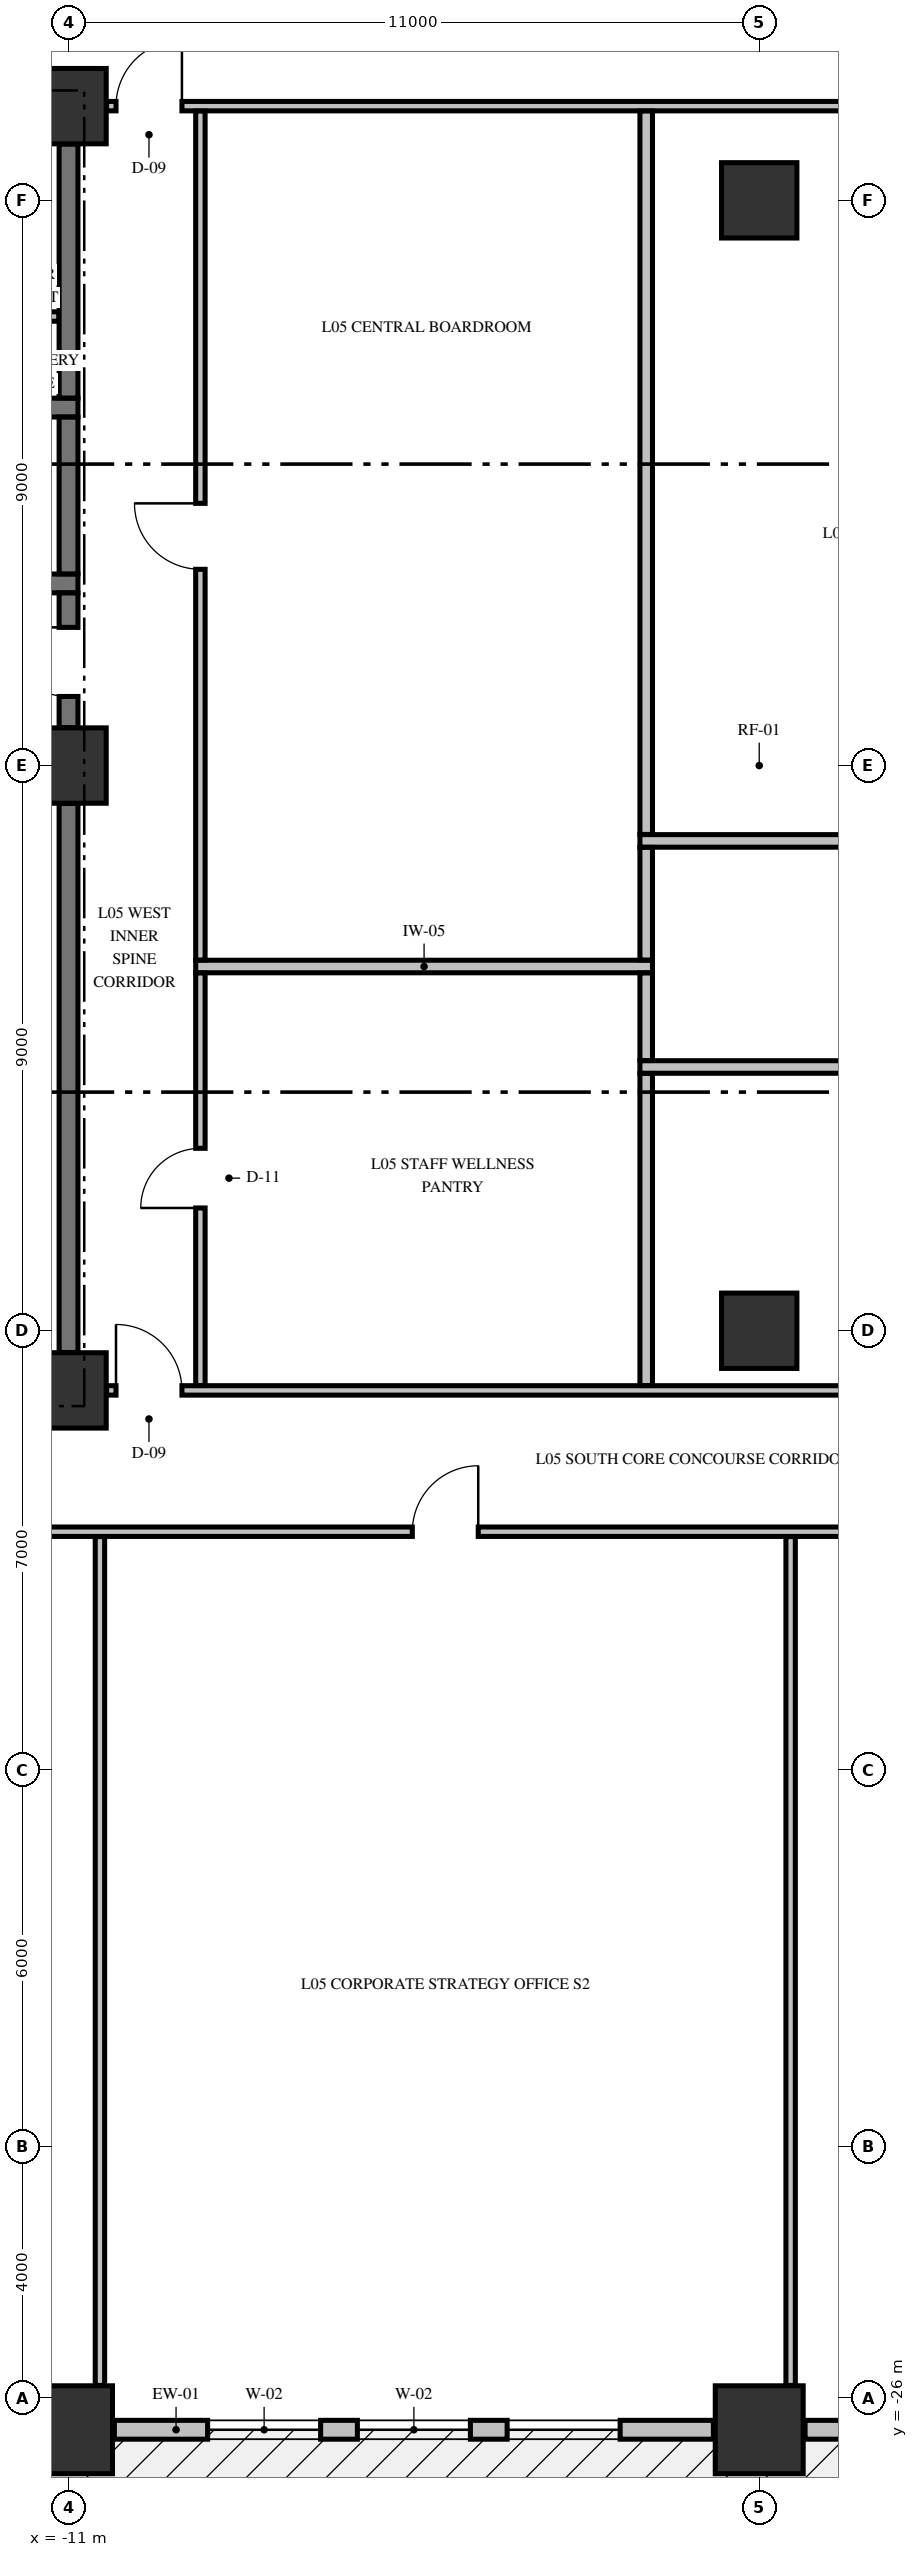
"""IFC4 building model, lengths in metres.
Left out: names, types, materials, properties, quantities, classifications, styles, units other than length and angle.
Written with IfcOpenShell. Run it as: python <this file> out.ifc"""

import sys

from ifc_helpers import new_model, si_unit, direction, frame, frame_2d, origin, origin_2d, place, context, subcontext, project, spatial, rectangle, extrude, element, fill, save


model = new_model("IFC4")
c1 = context("Model", 3, precision=1e-05, world=origin(), true_north=direction((0.0, 1.0)))
c2 = subcontext(c1, "Body", "Model", "MODEL_VIEW")
j1 = project(units=[si_unit("LENGTHUNIT", "METRE"), si_unit("PLANEANGLEUNIT", "RADIAN")], contexts=[c1])
p1 = place(None, origin())
s1 = spatial("IfcSite", under=j1, at=p1, CompositionType="ELEMENT")
p2 = place(p1, origin())
s2 = spatial("IfcBuilding", under=s1, at=p2, CompositionType="ELEMENT")
p3 = place(p2, frame((0.0, 0.0, 27.2)))
s3 = spatial("IfcBuildingStorey", under=s2, at=p3, CompositionType="ELEMENT", Elevation=27.2)
for number, where, z_axis, x_axis in (
    (1, (-11.0, -26.5, -0.45), (0.0, 0.0, 1.0), (1.0, 0.0, 0.0)),
    (2, (0.0, -26.5, -0.45), (0.0, 0.0, 1.0), (1.0, 0.0, 0.0)),
):
    element("IfcColumn", number, at=place(p3, frame(where, z_axis=z_axis, x_axis=x_axis)), inside=s3, PredefinedType="COLUMN", context=c2, shape_type="SweptSolid", body=[
        extrude(rectangle(XDim=1.4, YDim=1.4, at=origin_2d()), origin(), (0.0, 0.0, 1.0), 3.77),
    ])
for number, where, z_axis, x_axis in (
    (3, (-11.0, -9.95, -0.45), (0.0, 0.0, 1.0), (1.0, 0.0, 0.0)),
    (4, (-11.0, 0.0, -0.45), (0.0, 0.0, 1.0), (1.0, 0.0, 0.0)),
    (5, (-11.0, 10.5, -0.45), (0.0, 0.0, 1.0), (1.0, 0.0, 0.0)),
    (6, (0.0, -9.0, -0.45), (0.0, 0.0, 1.0), (1.0, 0.0, 0.0)),
    (7, (0.0, 9.0, -0.45), (0.0, 0.0, 1.0), (1.0, 0.0, 0.0)),
):
    element("IfcColumn", number, at=place(p3, frame(where, z_axis=z_axis, x_axis=x_axis)), inside=s3, PredefinedType="COLUMN", context=c2, shape_type="SweptSolid", body=[
        extrude(rectangle(XDim=1.2, YDim=1.2, at=origin_2d()), origin(), (0.0, 0.0, 1.0), 3.77),
    ])
p4 = place(p3, frame((-10.27, -26.5, 0.0), z_axis=(0.0, 0.0, 1.0), x_axis=(1.0, 0.0, 0.0)))
e8 = element("IfcWall", 8, at=p4, inside=s3, PredefinedType="STANDARD", context=c2, shape_type="SweptSolid", body=[
    extrude(rectangle(XDim=9.54, YDim=0.3, at=frame_2d((4.77, 0.0))), origin(), (0.0, 0.0, 1.0), 2.712),
])
p5 = place(p4, frame((1.485, 0.0, 0.78)))
e9 = element("IfcOpeningElement", 9, at=p5, cuts=e8, PredefinedType="OPENING", context=c2, shape_type="SweptSolid", body=[
    extrude(rectangle(XDim=1.8, YDim=1.72, at=frame_2d((0.9, 0.86))), frame((0.0, 0.16, 0.0), z_axis=(0.0, -1.0, 0.0), x_axis=(1.0, 0.0, 0.0)), (0.0, 0.0, 1.0), 0.32),
])
p6 = place(p4, frame((3.87, 0.0, 0.78)))
e10 = element("IfcOpeningElement", 10, at=p6, cuts=e8, PredefinedType="OPENING", context=c2, shape_type="SweptSolid", body=[
    extrude(rectangle(XDim=1.8, YDim=1.72, at=frame_2d((0.9, 0.86))), frame((0.0, 0.16, 0.0), z_axis=(0.0, -1.0, 0.0), x_axis=(1.0, 0.0, 0.0)), (0.0, 0.0, 1.0), 0.32),
])
p7 = place(p4, frame((6.255, 0.0, 0.78)))
e11 = element("IfcOpeningElement", 11, at=p7, cuts=e8, PredefinedType="OPENING", context=c2, shape_type="SweptSolid", body=[
    extrude(rectangle(XDim=1.8, YDim=1.72, at=frame_2d((0.9, 0.86))), frame((0.0, 0.16, 0.0), z_axis=(0.0, -1.0, 0.0), x_axis=(1.0, 0.0, 0.0)), (0.0, 0.0, 1.0), 0.32),
])
p8 = place(p3, frame((0.73, -26.5, 0.0), z_axis=(0.0, 0.0, 1.0), x_axis=(1.0, 0.0, 0.0)))
e12 = element("IfcWall", 12, at=p8, inside=s3, PredefinedType="STANDARD", context=c2, shape_type="SweptSolid", body=[
    extrude(rectangle(XDim=9.54, YDim=0.3, at=frame_2d((4.77, 0.0))), origin(), (0.0, 0.0, 1.0), 2.712),
])
p9 = place(p8, frame((1.485, 0.0, 0.78)))
e13 = element("IfcOpeningElement", 13, at=p9, cuts=e12, PredefinedType="OPENING", context=c2, shape_type="SweptSolid", body=[
    extrude(rectangle(XDim=1.8, YDim=1.72, at=frame_2d((0.9, 0.86))), frame((0.0, 0.16, 0.0), z_axis=(0.0, -1.0, 0.0), x_axis=(1.0, 0.0, 0.0)), (0.0, 0.0, 1.0), 0.32),
])
p10 = place(p8, frame((3.87, 0.0, 0.78)))
e14 = element("IfcOpeningElement", 14, at=p10, cuts=e12, PredefinedType="OPENING", context=c2, shape_type="SweptSolid", body=[
    extrude(rectangle(XDim=1.8, YDim=1.72, at=frame_2d((0.9, 0.86))), frame((0.0, 0.16, 0.0), z_axis=(0.0, -1.0, 0.0), x_axis=(1.0, 0.0, 0.0)), (0.0, 0.0, 1.0), 0.32),
])
p11 = place(p8, frame((6.255, 0.0, 0.78)))
e15 = element("IfcOpeningElement", 15, at=p11, cuts=e12, PredefinedType="OPENING", context=c2, shape_type="SweptSolid", body=[
    extrude(rectangle(XDim=1.8, YDim=1.72, at=frame_2d((0.9, 0.86))), frame((0.0, 0.16, 0.0), z_axis=(0.0, -1.0, 0.0), x_axis=(1.0, 0.0, 0.0)), (0.0, 0.0, 1.0), 0.32),
])
p12 = place(p3, frame((-14.875, 2.9, 0.0), z_axis=(0.0, 0.0, 1.0), x_axis=(1.0, 0.0, 0.0)))
e16 = element("IfcWall", 16, at=p12, inside=s3, PredefinedType="SHEAR", context=c2, shape_type="SweptSolid", body=[
    extrude(rectangle(XDim=4.025, YDim=0.3, at=frame_2d((2.012, 0.0))), origin(), (0.0, 0.0, 1.0), 3.32),
])
p13 = place(p12, frame((2.075, 0.0, 0.0)))
e17 = element("IfcOpeningElement", 17, at=p13, cuts=e16, PredefinedType="OPENING", context=c2, shape_type="SweptSolid", body=[
    extrude(rectangle(XDim=1.1, YDim=2.2, at=frame_2d((0.55, 1.1))), frame((0.0, 0.16, 0.0), z_axis=(0.0, -1.0, 0.0), x_axis=(1.0, 0.0, 0.0)), (0.0, 0.0, 1.0), 0.32),
])
p14 = place(p3, frame((-14.875, 5.7, 0.0), z_axis=(0.0, 0.0, 1.0), x_axis=(1.0, 0.0, 0.0)))
e18 = element("IfcWall", 18, at=p14, inside=s3, PredefinedType="SHEAR", context=c2, shape_type="SweptSolid", body=[
    extrude(rectangle(XDim=4.025, YDim=0.3, at=frame_2d((2.012, 0.0))), origin(), (0.0, 0.0, 1.0), 3.32),
])
p15 = place(p3, frame((-23.835, -12.2, 0.0), z_axis=(0.0, 0.0, 1.0), x_axis=(1.0, 0.0, 0.0)))
e19 = element("IfcWall", 19, at=p15, inside=s3, PredefinedType="PARTITIONING", context=c2, shape_type="SweptSolid", body=[
    extrude(rectangle(XDim=52.67, YDim=0.15, at=frame_2d((26.335, 0.0))), origin(), (0.0, 0.0, 1.0), 3.32),
])
p16 = place(p15, frame((8.16, 0.0, 0.0)))
e20 = element("IfcOpeningElement", 20, at=p16, cuts=e19, PredefinedType="OPENING", context=c2, shape_type="SweptSolid", body=[
    extrude(rectangle(XDim=1.05, YDim=2.15, at=frame_2d((0.525, 1.075))), frame((0.0, 0.085, 0.0), z_axis=(0.0, -1.0, 0.0), x_axis=(1.0, 0.0, 0.0)), (0.0, 0.0, 1.0), 0.17),
])
p17 = place(p15, frame((18.31, 0.0, 0.0)))
e21 = element("IfcOpeningElement", 21, at=p17, cuts=e19, PredefinedType="OPENING", context=c2, shape_type="SweptSolid", body=[
    extrude(rectangle(XDim=1.05, YDim=2.15, at=frame_2d((0.525, 1.075))), frame((0.0, 0.085, 0.0), z_axis=(0.0, -1.0, 0.0), x_axis=(1.0, 0.0, 0.0)), (0.0, 0.0, 1.0), 0.17),
])
p18 = place(p15, frame((41.46, 0.0, 0.0)))
e22 = element("IfcOpeningElement", 22, at=p18, cuts=e19, PredefinedType="OPENING", context=c2, shape_type="SweptSolid", body=[
    extrude(rectangle(XDim=1.05, YDim=2.15, at=frame_2d((0.525, 1.075))), frame((0.0, 0.085, 0.0), z_axis=(0.0, -1.0, 0.0), x_axis=(1.0, 0.0, 0.0)), (0.0, 0.0, 1.0), 0.17),
])
p19 = place(p3, frame((-10.394, -9.95, 0.0), z_axis=(0.0, 0.0, 1.0), x_axis=(1.0, 0.0, 0.0)))
e23 = element("IfcWall", 23, at=p19, inside=s3, PredefinedType="PARTITIONING", context=c2, shape_type="SweptSolid", body=[
    extrude(rectangle(XDim=20.788, YDim=0.15, at=frame_2d((10.394, 0.0))), origin(), (0.0, 0.0, 1.0), 3.32),
])
p20 = place(p19, frame((0.15, 0.0, 0.0)))
e24 = element("IfcOpeningElement", 24, at=p20, cuts=e23, PredefinedType="OPENING", context=c2, shape_type="SweptSolid", body=[
    extrude(rectangle(XDim=1.05, YDim=2.15, at=frame_2d((0.525, 1.075))), frame((0.0, 0.085, 0.0), z_axis=(0.0, -1.0, 0.0), x_axis=(1.0, 0.0, 0.0)), (0.0, 0.0, 1.0), 0.17),
])
p21 = place(p19, frame((19.588, 0.0, 0.0)))
e25 = element("IfcOpeningElement", 25, at=p21, cuts=e23, PredefinedType="OPENING", context=c2, shape_type="SweptSolid", body=[
    extrude(rectangle(XDim=1.05, YDim=2.15, at=frame_2d((0.525, 1.075))), frame((0.0, 0.085, 0.0), z_axis=(0.0, -1.0, 0.0), x_axis=(1.0, 0.0, 0.0)), (0.0, 0.0, 1.0), 0.17),
])
p22 = place(p19, frame((11.969, 0.0, 0.0)))
e26 = element("IfcOpeningElement", 26, at=p22, cuts=e23, PredefinedType="OPENING", context=c2, shape_type="SweptSolid", body=[
    extrude(rectangle(XDim=0.95, YDim=2.15, at=frame_2d((0.475, 1.075))), frame((0.0, 0.085, 0.0), z_axis=(0.0, -1.0, 0.0), x_axis=(1.0, 0.0, 0.0)), (0.0, 0.0, 1.0), 0.17),
])
p23 = place(p3, frame((-1.9, -4.8, 0.0), z_axis=(0.0, 0.0, 1.0), x_axis=(1.0, 0.0, 0.0)))
e27 = element("IfcWall", 27, at=p23, inside=s3, PredefinedType="PARTITIONING", context=c2, shape_type="SweptSolid", body=[
    extrude(rectangle(XDim=10.875, YDim=0.2, at=frame_2d((5.438, 0.0))), origin(), (0.0, 0.0, 1.0), 3.32),
])
p24 = place(p3, frame((-8.975, -3.2, 0.0), z_axis=(0.0, 0.0, 1.0), x_axis=(1.0, 0.0, 0.0)))
e28 = element("IfcWall", 28, at=p24, inside=s3, PredefinedType="PARTITIONING", context=c2, shape_type="SweptSolid", body=[
    extrude(rectangle(XDim=7.275, YDim=0.2, at=frame_2d((3.638, 0.0))), origin(), (0.0, 0.0, 1.0), 3.32),
])
p25 = place(p3, frame((-1.9, -1.2, 0.0), z_axis=(0.0, 0.0, 1.0), x_axis=(1.0, 0.0, 0.0)))
e29 = element("IfcWall", 29, at=p25, inside=s3, PredefinedType="PARTITIONING", context=c2, shape_type="SweptSolid", body=[
    extrude(rectangle(XDim=10.875, YDim=0.2, at=frame_2d((5.438, 0.0))), origin(), (0.0, 0.0, 1.0), 3.32),
])
p26 = place(p3, frame((-13.225, 7.15, 0.0), z_axis=(0.0, 0.0, 1.0), x_axis=(1.0, 0.0, 0.0)))
e30 = element("IfcWall", 30, at=p26, inside=s3, PredefinedType="PARTITIONING", context=c2, shape_type="SweptSolid", body=[
    extrude(rectangle(XDim=2.072, YDim=0.15, at=frame_2d((1.036, 0.0))), origin(), (0.0, 0.0, 1.0), 3.32),
])
p27 = place(p3, frame((-10.394, 10.5, 0.0), z_axis=(0.0, 0.0, 1.0), x_axis=(1.0, 0.0, 0.0)))
e31 = element("IfcWall", 31, at=p27, inside=s3, PredefinedType="PARTITIONING", context=c2, shape_type="SweptSolid", body=[
    extrude(rectangle(XDim=20.788, YDim=0.15, at=frame_2d((10.394, 0.0))), origin(), (0.0, 0.0, 1.0), 3.32),
])
p28 = place(p27, frame((0.15, 0.0, 0.0)))
e32 = element("IfcOpeningElement", 32, at=p28, cuts=e31, PredefinedType="OPENING", context=c2, shape_type="SweptSolid", body=[
    extrude(rectangle(XDim=1.05, YDim=2.15, at=frame_2d((0.525, 1.075))), frame((0.0, 0.085, 0.0), z_axis=(0.0, -1.0, 0.0), x_axis=(1.0, 0.0, 0.0)), (0.0, 0.0, 1.0), 0.17),
])
p29 = place(p27, frame((19.588, 0.0, 0.0)))
e33 = element("IfcOpeningElement", 33, at=p29, cuts=e31, PredefinedType="OPENING", context=c2, shape_type="SweptSolid", body=[
    extrude(rectangle(XDim=1.05, YDim=2.15, at=frame_2d((0.525, 1.075))), frame((0.0, 0.085, 0.0), z_axis=(0.0, -1.0, 0.0), x_axis=(1.0, 0.0, 0.0)), (0.0, 0.0, 1.0), 0.17),
])
p30 = place(p3, frame((-11.0, -9.346, 0.0), z_axis=(0.0, 0.0, 1.0), x_axis=(0.0, 1.0, 0.0)))
e34 = element("IfcWall", 34, at=p30, inside=s3, PredefinedType="SHEAR", context=c2, shape_type="SweptSolid", body=[
    extrude(rectangle(XDim=8.742, YDim=0.3, at=frame_2d((4.371, 0.0))), origin(), (0.0, 0.0, 1.0), 3.32),
])
p31 = place(p3, frame((-11.0, 0.604, 0.0), z_axis=(0.0, 0.0, 1.0), x_axis=(0.0, 1.0, 0.0)))
e35 = element("IfcWall", 35, at=p31, inside=s3, PredefinedType="SHEAR", context=c2, shape_type="SweptSolid", body=[
    extrude(rectangle(XDim=2.144, YDim=0.3, at=frame_2d((1.072, 0.0))), origin(), (0.0, 0.0, 1.0), 3.32),
])
p32 = place(p31, frame((0.496, 0.0, 0.0)))
e36 = element("IfcOpeningElement", 36, at=p32, cuts=e35, PredefinedType="OPENING", context=c2, shape_type="SweptSolid", body=[
    extrude(rectangle(XDim=1.1, YDim=2.15, at=frame_2d((0.55, 1.075))), frame((0.0, 0.16, 0.0), z_axis=(0.0, -1.0, 0.0), x_axis=(1.0, 0.0, 0.0)), (0.0, 0.0, 1.0), 0.32),
])
p33 = place(p3, frame((-11.0, 3.052, 0.0), z_axis=(0.0, 0.0, 1.0), x_axis=(0.0, 1.0, 0.0)))
e37 = element("IfcWall", 37, at=p33, inside=s3, PredefinedType="SHEAR", context=c2, shape_type="SweptSolid", body=[
    extrude(rectangle(XDim=2.496, YDim=0.3, at=frame_2d((1.248, 0.0))), origin(), (0.0, 0.0, 1.0), 3.32),
])
p34 = place(p3, frame((-11.0, 5.852, 0.0), z_axis=(0.0, 0.0, 1.0), x_axis=(0.0, 1.0, 0.0)))
e38 = element("IfcWall", 38, at=p34, inside=s3, PredefinedType="SHEAR", context=c2, shape_type="SweptSolid", body=[
    extrude(rectangle(XDim=4.044, YDim=0.3, at=frame_2d((2.022, 0.0))), origin(), (0.0, 0.0, 1.0), 3.32),
])
p35 = place(p3, frame((-10.5, -25.794, 0.0), z_axis=(0.0, 0.0, 1.0), x_axis=(0.0, 1.0, 0.0)))
e39 = element("IfcWall", 39, at=p35, inside=s3, PredefinedType="PARTITIONING", context=c2, shape_type="SweptSolid", body=[
    extrude(rectangle(XDim=13.516, YDim=0.15, at=frame_2d((6.758, 0.0))), origin(), (0.0, 0.0, 1.0), 3.32),
])
p36 = place(p3, frame((-8.9, -9.872, 0.0), z_axis=(0.0, 0.0, 1.0), x_axis=(0.0, 1.0, 0.0)))
e40 = element("IfcWall", 40, at=p36, inside=s3, PredefinedType="PARTITIONING", context=c2, shape_type="SweptSolid", body=[
    extrude(rectangle(XDim=6.569, YDim=0.15, at=frame_2d((3.285, 0.0))), origin(), (0.0, 0.0, 1.0), 3.32),
])
p37 = place(p36, frame((2.827, 0.0, 0.0)))
e41 = element("IfcOpeningElement", 41, at=p37, cuts=e40, PredefinedType="OPENING", context=c2, shape_type="SweptSolid", body=[
    extrude(rectangle(XDim=0.95, YDim=2.15, at=frame_2d((0.475, 1.075))), frame((0.0, 0.085, 0.0), z_axis=(0.0, -1.0, 0.0), x_axis=(1.0, 0.0, 0.0)), (0.0, 0.0, 1.0), 0.17),
])
p38 = place(p3, frame((-8.9, -3.097, 0.0), z_axis=(0.0, 0.0, 1.0), x_axis=(0.0, 1.0, 0.0)))
e42 = element("IfcWall", 42, at=p38, inside=s3, PredefinedType="PARTITIONING", context=c2, shape_type="SweptSolid", body=[
    extrude(rectangle(XDim=13.519, YDim=0.15, at=frame_2d((6.76, 0.0))), origin(), (0.0, 0.0, 1.0), 3.32),
])
p39 = place(p38, frame((6.222, 0.0, 0.0)))
e43 = element("IfcOpeningElement", 43, at=p39, cuts=e42, PredefinedType="OPENING", context=c2, shape_type="SweptSolid", body=[
    extrude(rectangle(XDim=1.05, YDim=2.15, at=frame_2d((0.525, 1.075))), frame((0.0, 0.085, 0.0), z_axis=(0.0, -1.0, 0.0), x_axis=(1.0, 0.0, 0.0)), (0.0, 0.0, 1.0), 0.17),
])
p40 = place(p3, frame((-1.8, -9.872, 0.0), z_axis=(0.0, 0.0, 1.0), x_axis=(0.0, 1.0, 0.0)))
e44 = element("IfcWall", 44, at=p40, inside=s3, PredefinedType="PARTITIONING", context=c2, shape_type="SweptSolid", body=[
    extrude(rectangle(XDim=4.969, YDim=0.2, at=frame_2d((2.484, 0.0))), origin(), (0.0, 0.0, 1.0), 3.32),
])
p41 = place(p3, frame((-1.8, -4.697, 0.0), z_axis=(0.0, 0.0, 1.0), x_axis=(0.0, 1.0, 0.0)))
e45 = element("IfcWall", 45, at=p41, inside=s3, PredefinedType="PARTITIONING", context=c2, shape_type="SweptSolid", body=[
    extrude(rectangle(XDim=1.394, YDim=0.2, at=frame_2d((0.697, 0.0))), origin(), (0.0, 0.0, 1.0), 3.32),
])
p42 = place(p3, frame((-1.8, -3.097, 0.0), z_axis=(0.0, 0.0, 1.0), x_axis=(0.0, 1.0, 0.0)))
e46 = element("IfcWall", 46, at=p42, inside=s3, PredefinedType="PARTITIONING", context=c2, shape_type="SweptSolid", body=[
    extrude(rectangle(XDim=1.794, YDim=0.2, at=frame_2d((0.897, 0.0))), origin(), (0.0, 0.0, 1.0), 3.32),
])
p43 = place(p3, frame((-1.8, -1.097, 0.0), z_axis=(0.0, 0.0, 1.0), x_axis=(0.0, 1.0, 0.0)))
e47 = element("IfcWall", 47, at=p43, inside=s3, PredefinedType="PARTITIONING", context=c2, shape_type="SweptSolid", body=[
    extrude(rectangle(XDim=11.519, YDim=0.2, at=frame_2d((5.76, 0.0))), origin(), (0.0, 0.0, 1.0), 3.32),
])
p44 = place(p3, frame((0.5, -25.794, 0.0), z_axis=(0.0, 0.0, 1.0), x_axis=(0.0, 1.0, 0.0)))
e48 = element("IfcWall", 48, at=p44, inside=s3, PredefinedType="PARTITIONING", context=c2, shape_type="SweptSolid", body=[
    extrude(rectangle(XDim=13.516, YDim=0.15, at=frame_2d((6.758, 0.0))), origin(), (0.0, 0.0, 1.0), 3.32),
])
p45 = place(p5, origin())
e49 = element("IfcWindow", 49, at=p45, inside=s3, PartitioningType="SINGLE_PANEL", PredefinedType="WINDOW", context=c2, shape_type="SweptSolid", body=[
    extrude(rectangle(XDim=1.8, YDim=1.72, at=frame_2d((0.9, 0.86))), frame((0.0, 0.03, 0.0), z_axis=(0.0, -1.0, 0.0), x_axis=(1.0, 0.0, 0.0)), (0.0, 0.0, 1.0), 0.06),
])
fill(e9, e49)
p46 = place(p6, origin())
e50 = element("IfcWindow", 50, at=p46, inside=s3, PartitioningType="SINGLE_PANEL", PredefinedType="WINDOW", context=c2, shape_type="SweptSolid", body=[
    extrude(rectangle(XDim=1.8, YDim=1.72, at=frame_2d((0.9, 0.86))), frame((0.0, 0.03, 0.0), z_axis=(0.0, -1.0, 0.0), x_axis=(1.0, 0.0, 0.0)), (0.0, 0.0, 1.0), 0.06),
])
fill(e10, e50)
p47 = place(p7, origin())
e51 = element("IfcWindow", 51, at=p47, inside=s3, PartitioningType="SINGLE_PANEL", PredefinedType="WINDOW", context=c2, shape_type="SweptSolid", body=[
    extrude(rectangle(XDim=1.8, YDim=1.72, at=frame_2d((0.9, 0.86))), frame((0.0, 0.03, 0.0), z_axis=(0.0, -1.0, 0.0), x_axis=(1.0, 0.0, 0.0)), (0.0, 0.0, 1.0), 0.06),
])
fill(e11, e51)
p48 = place(p32, origin())
e52 = element("IfcDoor", 52, at=p48, inside=s3, OperationType="SINGLE_SWING_RIGHT", PredefinedType="DOOR", context=c2, shape_type="SweptSolid", body=[
    extrude(rectangle(XDim=1.1, YDim=2.15, at=frame_2d((0.55, 1.075))), frame((0.0, 0.025, 0.0), z_axis=(0.0, -1.0, 0.0), x_axis=(1.0, 0.0, 0.0)), (0.0, 0.0, 1.0), 0.05),
])
fill(e36, e52)
p49 = place(p28, origin())
e53 = element("IfcDoor", 53, at=p49, inside=s3, OperationType="SINGLE_SWING_RIGHT", PredefinedType="DOOR", context=c2, shape_type="SweptSolid", body=[
    extrude(rectangle(XDim=1.05, YDim=2.15, at=frame_2d((0.525, 1.075))), frame((0.0, 0.025, 0.0), z_axis=(0.0, -1.0, 0.0), x_axis=(1.0, 0.0, 0.0)), (0.0, 0.0, 1.0), 0.05),
])
fill(e32, e53)
p50 = place(p20, origin())
e54 = element("IfcDoor", 54, at=p50, inside=s3, OperationType="SINGLE_SWING_LEFT", PredefinedType="DOOR", context=c2, shape_type="SweptSolid", body=[
    extrude(rectangle(XDim=1.05, YDim=2.15, at=frame_2d((0.525, 1.075))), frame((0.0, 0.025, 0.0), z_axis=(0.0, -1.0, 0.0), x_axis=(1.0, 0.0, 0.0)), (0.0, 0.0, 1.0), 0.05),
])
fill(e24, e54)
p51 = place(p17, origin())
e55 = element("IfcDoor", 55, at=p51, inside=s3, OperationType="SINGLE_SWING_RIGHT", PredefinedType="DOOR", context=c2, shape_type="SweptSolid", body=[
    extrude(rectangle(XDim=1.05, YDim=2.15, at=frame_2d((0.525, 1.075))), frame((0.0, 0.025, 0.0), z_axis=(0.0, -1.0, 0.0), x_axis=(1.0, 0.0, 0.0)), (0.0, 0.0, 1.0), 0.05),
])
fill(e21, e55)
p52 = place(p39, origin())
e56 = element("IfcDoor", 56, at=p52, inside=s3, OperationType="SINGLE_SWING_RIGHT", PredefinedType="DOOR", context=c2, shape_type="SweptSolid", body=[
    extrude(rectangle(XDim=1.05, YDim=2.15, at=frame_2d((0.525, 1.075))), frame((0.0, 0.025, 0.0), z_axis=(0.0, -1.0, 0.0), x_axis=(1.0, 0.0, 0.0)), (0.0, 0.0, 1.0), 0.05),
])
fill(e43, e56)
p53 = place(p37, origin())
e57 = element("IfcDoor", 57, at=p53, inside=s3, OperationType="SINGLE_SWING_LEFT", PredefinedType="DOOR", context=c2, shape_type="SweptSolid", body=[
    extrude(rectangle(XDim=0.95, YDim=2.15, at=frame_2d((0.475, 1.075))), frame((0.0, 0.025, 0.0), z_axis=(0.0, -1.0, 0.0), x_axis=(1.0, 0.0, 0.0)), (0.0, 0.0, 1.0), 0.05),
])
fill(e41, e57)
save(model, sys.argv[1])
